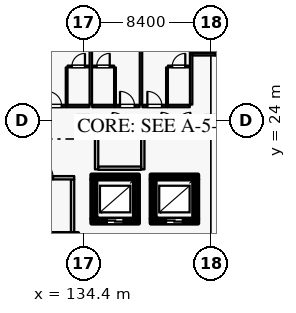
"""IFC4 building model, lengths in metres.
Left out: names, types, materials, properties, quantities, classifications, styles, units other than length and angle.
Written with IfcOpenShell. Run it as: python <this file> out.ifc"""

import sys

from ifc_helpers import new_model, si_unit, direction, frame, frame_2d, origin, origin_2d, place, context, subcontext, project, spatial, rectangle, extrude, element, fill, save


model = new_model("IFC4")
c1 = context("Model", 3, precision=1e-05, world=origin(), true_north=direction((0.0, 1.0)))
c2 = subcontext(c1, "Body", "Model", "MODEL_VIEW")
j1 = project(units=[si_unit("LENGTHUNIT", "METRE"), si_unit("PLANEANGLEUNIT", "RADIAN")], contexts=[c1])
p1 = place(None, origin())
s1 = spatial("IfcSite", under=j1, at=p1, CompositionType="ELEMENT")
p2 = place(p1, origin())
s2 = spatial("IfcBuilding", under=s1, at=p2, CompositionType="ELEMENT")
p3 = place(p2, frame((0.0, 0.0, 32.4)))
s3 = spatial("IfcBuildingStorey", under=s2, at=p3, CompositionType="ELEMENT", Elevation=32.4)
for number, where, z_axis, x_axis in (
    (1, (134.4, 24.0, 0.0), (0.0, 0.0, 1.0), (1.0, 0.0, 0.0)),
    (2, (142.8, 24.0, 0.0), (0.0, 0.0, 1.0), (1.0, 0.0, 0.0)),
):
    element("IfcColumn", number, at=place(p3, frame(where, z_axis=z_axis, x_axis=x_axis)), inside=s3, PredefinedType="COLUMN", context=c2, shape_type="SweptSolid", body=[
        extrude(rectangle(XDim=0.6, YDim=0.6, at=origin_2d()), origin(), (0.0, 0.0, 1.0), 3.6),
    ])
p4 = place(p3, frame((134.95, 17.4, 0.0), z_axis=(0.0, 0.0, 1.0), x_axis=(1.0, 0.0, 0.0)))
e3 = element("IfcWall", 3, at=p4, inside=s3, PredefinedType="SHEAR", context=c2, shape_type="SweptSolid", body=[
    extrude(rectangle(XDim=3.1, YDim=0.3, at=frame_2d((1.55, 0.0))), origin(), (0.0, 0.0, 1.0), 3.335),
])
p5 = place(p4, frame((1.0, 0.0, 0.0)))
e4 = element("IfcOpeningElement", 4, at=p5, cuts=e3, PredefinedType="OPENING", context=c2, shape_type="SweptSolid", body=[
    extrude(rectangle(XDim=1.1, YDim=2.2, at=frame_2d((0.55, 1.1))), frame((0.0, 0.16, 0.0), z_axis=(0.0, -1.0, 0.0), x_axis=(1.0, 0.0, 0.0)), (0.0, 0.0, 1.0), 0.32),
])
p6 = place(p3, frame((137.9, 17.555, 0.0), z_axis=(0.0, 0.0, 1.0), x_axis=(0.0, 1.0, 0.0)))
e5 = element("IfcWall", 5, at=p6, inside=s3, PredefinedType="SHEAR", context=c2, shape_type="SweptSolid", body=[
    extrude(rectangle(XDim=2.59, YDim=0.3, at=frame_2d((1.295, 0.0))), origin(), (0.0, 0.0, 1.0), 3.335),
])
p7 = place(p3, frame((138.05, 20.3, 0.0), z_axis=(0.0, 0.0, 1.0), x_axis=(-1.0, 0.0, 0.0)))
e6 = element("IfcWall", 6, at=p7, inside=s3, PredefinedType="SHEAR", context=c2, shape_type="SweptSolid", body=[
    extrude(rectangle(XDim=3.1, YDim=0.3, at=frame_2d((1.55, 0.0))), origin(), (0.0, 0.0, 1.0), 3.335),
])
p8 = place(p3, frame((135.1, 20.145, 0.0), z_axis=(0.0, 0.0, 1.0), x_axis=(0.0, -1.0, 0.0)))
e7 = element("IfcWall", 7, at=p8, inside=s3, PredefinedType="SHEAR", context=c2, shape_type="SweptSolid", body=[
    extrude(rectangle(XDim=2.59, YDim=0.3, at=frame_2d((1.295, 0.0))), origin(), (0.0, 0.0, 1.0), 3.335),
])
p9 = place(p3, frame((138.85, 17.4, 0.0), z_axis=(0.0, 0.0, 1.0), x_axis=(1.0, 0.0, 0.0)))
e8 = element("IfcWall", 8, at=p9, inside=s3, PredefinedType="SHEAR", context=c2, shape_type="SweptSolid", body=[
    extrude(rectangle(XDim=3.1, YDim=0.3, at=frame_2d((1.55, 0.0))), origin(), (0.0, 0.0, 1.0), 3.335),
])
p10 = place(p9, frame((1.0, 0.0, 0.0)))
e9 = element("IfcOpeningElement", 9, at=p10, cuts=e8, PredefinedType="OPENING", context=c2, shape_type="SweptSolid", body=[
    extrude(rectangle(XDim=1.1, YDim=2.2, at=frame_2d((0.55, 1.1))), frame((0.0, 0.16, 0.0), z_axis=(0.0, -1.0, 0.0), x_axis=(1.0, 0.0, 0.0)), (0.0, 0.0, 1.0), 0.32),
])
p11 = place(p3, frame((141.8, 17.555, 0.0), z_axis=(0.0, 0.0, 1.0), x_axis=(0.0, 1.0, 0.0)))
e10 = element("IfcWall", 10, at=p11, inside=s3, PredefinedType="SHEAR", context=c2, shape_type="SweptSolid", body=[
    extrude(rectangle(XDim=2.59, YDim=0.3, at=frame_2d((1.295, 0.0))), origin(), (0.0, 0.0, 1.0), 3.335),
])
p12 = place(p3, frame((141.95, 20.3, 0.0), z_axis=(0.0, 0.0, 1.0), x_axis=(-1.0, 0.0, 0.0)))
e11 = element("IfcWall", 11, at=p12, inside=s3, PredefinedType="SHEAR", context=c2, shape_type="SweptSolid", body=[
    extrude(rectangle(XDim=3.1, YDim=0.3, at=frame_2d((1.55, 0.0))), origin(), (0.0, 0.0, 1.0), 3.335),
])
p13 = place(p3, frame((139.0, 20.145, 0.0), z_axis=(0.0, 0.0, 1.0), x_axis=(0.0, -1.0, 0.0)))
e12 = element("IfcWall", 12, at=p13, inside=s3, PredefinedType="SHEAR", context=c2, shape_type="SweptSolid", body=[
    extrude(rectangle(XDim=2.59, YDim=0.3, at=frame_2d((1.295, 0.0))), origin(), (0.0, 0.0, 1.0), 3.335),
])
p14 = place(p3, frame((134.06, 16.45, 0.0), z_axis=(0.0, 0.0, 1.0), x_axis=(-1.0, 0.0, 0.0)))
e13 = element("IfcWall", 13, at=p14, inside=s3, PredefinedType="SHEAR", context=c2, shape_type="SweptSolid", body=[
    extrude(rectangle(XDim=4.01, YDim=0.3, at=frame_2d((2.005, 0.0))), origin(), (0.0, 0.0, 1.0), 3.335),
])
p15 = place(p14, frame((1.635, 0.0, 0.0)))
e14 = element("IfcOpeningElement", 14, at=p15, cuts=e13, PredefinedType="OPENING", context=c2, shape_type="SweptSolid", body=[
    extrude(rectangle(XDim=1.25, YDim=2.25, at=frame_2d((0.625, 1.125))), frame((0.0, 0.16, 0.0), z_axis=(0.0, -1.0, 0.0), x_axis=(1.0, 0.0, 0.0)), (0.0, 0.0, 1.0), 0.32),
])
p16 = place(p3, frame((133.7, 16.605, 0.0), z_axis=(0.0, 0.0, 1.0), x_axis=(0.0, 1.0, 0.0)))
e15 = element("IfcWall", 15, at=p16, inside=s3, PredefinedType="PARTITIONING", context=c2, shape_type="SweptSolid", body=[
    extrude(rectangle(XDim=3.53, YDim=0.22, at=frame_2d((1.765, 0.0))), origin(), (0.0, 0.0, 1.0), 3.335),
])
p17 = place(p3, frame((129.79, 20.25, 0.0), z_axis=(0.0, 0.0, 1.0), x_axis=(1.0, 0.0, 0.0)))
e16 = element("IfcWall", 16, at=p17, inside=s3, PredefinedType="PARTITIONING", context=c2, shape_type="SweptSolid", body=[
    extrude(rectangle(XDim=4.02, YDim=0.22, at=frame_2d((2.01, 0.0))), origin(), (0.0, 0.0, 1.0), 3.335),
])
p18 = place(p17, frame((1.39, 0.0, 0.0)))
e17 = element("IfcOpeningElement", 17, at=p18, cuts=e16, PredefinedType="OPENING", context=c2, shape_type="SweptSolid", body=[
    extrude(rectangle(XDim=1.24, YDim=2.2, at=frame_2d((0.62, 1.1))), frame((0.0, 0.12, 0.0), z_axis=(0.0, -1.0, 0.0), x_axis=(1.0, 0.0, 0.0)), (0.0, 0.0, 1.0), 0.24),
])
p19 = place(p3, frame((131.69, 24.97, 0.0), z_axis=(0.0, 0.0, 1.0), x_axis=(1.0, 0.0, 0.0)))
e18 = element("IfcWall", 18, at=p19, inside=s3, PredefinedType="PARTITIONING", context=c2, shape_type="SweptSolid", body=[
    extrude(rectangle(XDim=1.62, YDim=0.16, at=frame_2d((0.81, 0.0))), origin(), (0.0, 0.0, 1.0), 3.335),
])
p20 = place(p19, frame((0.33, 0.0, 0.0)))
e19 = element("IfcOpeningElement", 19, at=p20, cuts=e18, PredefinedType="OPENING", context=c2, shape_type="SweptSolid", body=[
    extrude(rectangle(XDim=0.96, YDim=2.2, at=frame_2d((0.48, 1.1))), frame((0.0, 0.09, 0.0), z_axis=(0.0, -1.0, 0.0), x_axis=(1.0, 0.0, 0.0)), (0.0, 0.0, 1.0), 0.18),
])
p21 = place(p3, frame((133.32, 24.97, 0.0), z_axis=(0.0, 0.0, 1.0), x_axis=(1.0, 0.0, 0.0)))
e20 = element("IfcWall", 20, at=p21, inside=s3, PredefinedType="PARTITIONING", context=c2, shape_type="SweptSolid", body=[
    extrude(rectangle(XDim=1.49, YDim=0.16, at=frame_2d((0.745, 0.0))), origin(), (0.0, 0.0, 1.0), 3.335),
])
p22 = place(p3, frame((133.31, 25.06, 0.0), z_axis=(0.0, 0.0, 1.0), x_axis=(0.0, 1.0, 0.0)))
e21 = element("IfcWall", 21, at=p22, inside=s3, PredefinedType="PARTITIONING", context=c2, shape_type="SweptSolid", body=[
    extrude(rectangle(XDim=2.45, YDim=0.115, at=frame_2d((1.225, 0.0))), origin(), (0.0, 0.0, 1.0), 3.335),
])
p23 = place(p3, frame((133.37, 27.57, 0.0), z_axis=(0.0, 0.0, 1.0), x_axis=(1.0, 0.0, 0.0)))
e22 = element("IfcWall", 22, at=p23, inside=s3, PredefinedType="PARTITIONING", context=c2, shape_type="SweptSolid", body=[
    extrude(rectangle(XDim=1.43, YDim=0.115, at=frame_2d((0.715, 0.0))), origin(), (0.0, 0.0, 1.0), 3.335),
])
p24 = place(p23, frame((0.285, 0.0, 0.0)))
e23 = element("IfcOpeningElement", 23, at=p24, cuts=e22, PredefinedType="OPENING", context=c2, shape_type="SweptSolid", body=[
    extrude(rectangle(XDim=0.86, YDim=2.12, at=frame_2d((0.43, 1.06))), frame((0.0, 0.067, 0.0), z_axis=(0.0, -1.0, 0.0), x_axis=(1.0, 0.0, 0.0)), (0.0, 0.0, 1.0), 0.135),
])
p25 = place(p3, frame((134.99, 24.97, 0.0), z_axis=(0.0, 0.0, 1.0), x_axis=(1.0, 0.0, 0.0)))
e24 = element("IfcWall", 24, at=p25, inside=s3, PredefinedType="PARTITIONING", context=c2, shape_type="SweptSolid", body=[
    extrude(rectangle(XDim=1.49, YDim=0.16, at=frame_2d((0.745, 0.0))), origin(), (0.0, 0.0, 1.0), 3.335),
])
p26 = place(p3, frame((136.49, 24.97, 0.0), z_axis=(0.0, 0.0, 1.0), x_axis=(1.0, 0.0, 0.0)))
e25 = element("IfcWall", 25, at=p26, inside=s3, PredefinedType="PARTITIONING", context=c2, shape_type="SweptSolid", body=[
    extrude(rectangle(XDim=1.62, YDim=0.16, at=frame_2d((0.81, 0.0))), origin(), (0.0, 0.0, 1.0), 3.335),
])
p27 = place(p26, frame((0.33, 0.0, 0.0)))
e26 = element("IfcOpeningElement", 26, at=p27, cuts=e25, PredefinedType="OPENING", context=c2, shape_type="SweptSolid", body=[
    extrude(rectangle(XDim=0.96, YDim=2.2, at=frame_2d((0.48, 1.1))), frame((0.0, 0.09, 0.0), z_axis=(0.0, -1.0, 0.0), x_axis=(1.0, 0.0, 0.0)), (0.0, 0.0, 1.0), 0.18),
])
p28 = place(p3, frame((136.49, 25.06, 0.0), z_axis=(0.0, 0.0, 1.0), x_axis=(0.0, 1.0, 0.0)))
e27 = element("IfcWall", 27, at=p28, inside=s3, PredefinedType="PARTITIONING", context=c2, shape_type="SweptSolid", body=[
    extrude(rectangle(XDim=2.45, YDim=0.115, at=frame_2d((1.225, 0.0))), origin(), (0.0, 0.0, 1.0), 3.335),
])
p29 = place(p3, frame((135.0, 27.57, 0.0), z_axis=(0.0, 0.0, 1.0), x_axis=(1.0, 0.0, 0.0)))
e28 = element("IfcWall", 28, at=p29, inside=s3, PredefinedType="PARTITIONING", context=c2, shape_type="SweptSolid", body=[
    extrude(rectangle(XDim=1.43, YDim=0.115, at=frame_2d((0.715, 0.0))), origin(), (0.0, 0.0, 1.0), 3.335),
])
p30 = place(p29, frame((0.285, 0.0, 0.0)))
e29 = element("IfcOpeningElement", 29, at=p30, cuts=e28, PredefinedType="OPENING", context=c2, shape_type="SweptSolid", body=[
    extrude(rectangle(XDim=0.86, YDim=2.12, at=frame_2d((0.43, 1.06))), frame((0.0, 0.067, 0.0), z_axis=(0.0, -1.0, 0.0), x_axis=(1.0, 0.0, 0.0)), (0.0, 0.0, 1.0), 0.135),
])
p31 = place(p3, frame((134.9, 25.06, 0.0), z_axis=(0.0, 0.0, 1.0), x_axis=(0.0, 1.0, 0.0)))
e30 = element("IfcWall", 30, at=p31, inside=s3, PredefinedType="PARTITIONING", context=c2, shape_type="SweptSolid", body=[
    extrude(rectangle(XDim=6.6, YDim=0.16, at=frame_2d((3.3, 0.0))), origin(), (0.0, 0.0, 1.0), 3.335),
])
p32 = place(p3, frame((138.29, 24.97, 0.0), z_axis=(0.0, 0.0, 1.0), x_axis=(1.0, 0.0, 0.0)))
e31 = element("IfcWall", 31, at=p32, inside=s3, PredefinedType="PARTITIONING", context=c2, shape_type="SweptSolid", body=[
    extrude(rectangle(XDim=1.62, YDim=0.16, at=frame_2d((0.81, 0.0))), origin(), (0.0, 0.0, 1.0), 3.335),
])
p33 = place(p32, frame((0.33, 0.0, 0.0)))
e32 = element("IfcOpeningElement", 32, at=p33, cuts=e31, PredefinedType="OPENING", context=c2, shape_type="SweptSolid", body=[
    extrude(rectangle(XDim=0.96, YDim=2.2, at=frame_2d((0.48, 1.1))), frame((0.0, 0.09, 0.0), z_axis=(0.0, -1.0, 0.0), x_axis=(1.0, 0.0, 0.0)), (0.0, 0.0, 1.0), 0.18),
])
p34 = place(p3, frame((139.92, 24.97, 0.0), z_axis=(0.0, 0.0, 1.0), x_axis=(1.0, 0.0, 0.0)))
e33 = element("IfcWall", 33, at=p34, inside=s3, PredefinedType="PARTITIONING", context=c2, shape_type="SweptSolid", body=[
    extrude(rectangle(XDim=1.49, YDim=0.16, at=frame_2d((0.745, 0.0))), origin(), (0.0, 0.0, 1.0), 3.335),
])
p35 = place(p3, frame((139.91, 25.06, 0.0), z_axis=(0.0, 0.0, 1.0), x_axis=(0.0, 1.0, 0.0)))
e34 = element("IfcWall", 34, at=p35, inside=s3, PredefinedType="PARTITIONING", context=c2, shape_type="SweptSolid", body=[
    extrude(rectangle(XDim=2.45, YDim=0.115, at=frame_2d((1.225, 0.0))), origin(), (0.0, 0.0, 1.0), 3.335),
])
p36 = place(p3, frame((139.97, 27.57, 0.0), z_axis=(0.0, 0.0, 1.0), x_axis=(1.0, 0.0, 0.0)))
e35 = element("IfcWall", 35, at=p36, inside=s3, PredefinedType="PARTITIONING", context=c2, shape_type="SweptSolid", body=[
    extrude(rectangle(XDim=1.43, YDim=0.115, at=frame_2d((0.715, 0.0))), origin(), (0.0, 0.0, 1.0), 3.335),
])
p37 = place(p36, frame((0.285, 0.0, 0.0)))
e36 = element("IfcOpeningElement", 36, at=p37, cuts=e35, PredefinedType="OPENING", context=c2, shape_type="SweptSolid", body=[
    extrude(rectangle(XDim=0.86, YDim=2.12, at=frame_2d((0.43, 1.06))), frame((0.0, 0.067, 0.0), z_axis=(0.0, -1.0, 0.0), x_axis=(1.0, 0.0, 0.0)), (0.0, 0.0, 1.0), 0.135),
])
p38 = place(p3, frame((138.2, 25.06, 0.0), z_axis=(0.0, 0.0, 1.0), x_axis=(0.0, 1.0, 0.0)))
e37 = element("IfcWall", 37, at=p38, inside=s3, PredefinedType="PARTITIONING", context=c2, shape_type="SweptSolid", body=[
    extrude(rectangle(XDim=6.6, YDim=0.16, at=frame_2d((3.3, 0.0))), origin(), (0.0, 0.0, 1.0), 3.335),
])
p39 = place(p3, frame((141.5, 25.06, 0.0), z_axis=(0.0, 0.0, 1.0), x_axis=(0.0, 1.0, 0.0)))
e38 = element("IfcWall", 38, at=p39, inside=s3, PredefinedType="PARTITIONING", context=c2, shape_type="SweptSolid", body=[
    extrude(rectangle(XDim=3.39, YDim=0.16, at=frame_2d((1.695, 0.0))), origin(), (0.0, 0.0, 1.0), 3.335),
])
p40 = place(p3, frame((141.59, 28.37, 0.0), z_axis=(0.0, 0.0, 1.0), x_axis=(1.0, 0.0, 0.0)))
e39 = element("IfcWall", 39, at=p40, inside=s3, PredefinedType="PARTITIONING", context=c2, shape_type="SweptSolid", body=[
    extrude(rectangle(XDim=1.49, YDim=0.16, at=frame_2d((0.745, 0.0))), origin(), (0.0, 0.0, 1.0), 3.335),
])
p41 = place(p3, frame((143.09, 28.37, 0.0), z_axis=(0.0, 0.0, 1.0), x_axis=(1.0, 0.0, 0.0)))
e40 = element("IfcWall", 40, at=p41, inside=s3, PredefinedType="PARTITIONING", context=c2, shape_type="SweptSolid", body=[
    extrude(rectangle(XDim=1.62, YDim=0.16, at=frame_2d((0.81, 0.0))), origin(), (0.0, 0.0, 1.0), 3.335),
])
p42 = place(p41, frame((0.33, 0.0, 0.0)))
e41 = element("IfcOpeningElement", 41, at=p42, cuts=e40, PredefinedType="OPENING", context=c2, shape_type="SweptSolid", body=[
    extrude(rectangle(XDim=0.96, YDim=2.2, at=frame_2d((0.48, 1.1))), frame((0.0, 0.09, 0.0), z_axis=(0.0, -1.0, 0.0), x_axis=(1.0, 0.0, 0.0)), (0.0, 0.0, 1.0), 0.18),
])
p43 = place(p3, frame((143.09, 28.46, 0.0), z_axis=(0.0, 0.0, 1.0), x_axis=(0.0, 1.0, 0.0)))
e42 = element("IfcWall", 42, at=p43, inside=s3, PredefinedType="PARTITIONING", context=c2, shape_type="SweptSolid", body=[
    extrude(rectangle(XDim=1.74, YDim=0.115, at=frame_2d((0.87, 0.0))), origin(), (0.0, 0.0, 1.0), 3.335),
])
p44 = place(p3, frame((141.5, 28.46, 0.0), z_axis=(0.0, 0.0, 1.0), x_axis=(0.0, 1.0, 0.0)))
e43 = element("IfcWall", 43, at=p44, inside=s3, PredefinedType="PARTITIONING", context=c2, shape_type="SweptSolid", body=[
    extrude(rectangle(XDim=3.2, YDim=0.16, at=frame_2d((1.6, 0.0))), origin(), (0.0, 0.0, 1.0), 3.335),
])
p45 = place(p3, frame((138.96, 23.6, 0.0), z_axis=(0.0, 0.0, 1.0), x_axis=(1.0, 0.0, 0.0)))
e44 = element("IfcWall", 44, at=p45, inside=s3, PredefinedType="PARTITIONING", context=c2, shape_type="SweptSolid", body=[
    extrude(rectangle(XDim=3.08, YDim=0.14, at=frame_2d((1.54, 0.0))), origin(), (0.0, 0.0, 1.0), 3.335),
])
p46 = place(p45, frame((0.59, 0.0, 0.0)))
e45 = element("IfcOpeningElement", 45, at=p46, cuts=e44, PredefinedType="OPENING", context=c2, shape_type="SweptSolid", body=[
    extrude(rectangle(XDim=1.9, YDim=2.4, at=frame_2d((0.95, 1.2))), frame((0.0, 0.08, 0.0), z_axis=(0.0, -1.0, 0.0), x_axis=(1.0, 0.0, 0.0)), (0.0, 0.0, 1.0), 0.16),
])
p47 = place(p3, frame((135.36, 23.6, 0.0), z_axis=(0.0, 0.0, 1.0), x_axis=(1.0, 0.0, 0.0)))
e46 = element("IfcWall", 46, at=p47, inside=s3, PredefinedType="PARTITIONING", context=c2, shape_type="SweptSolid", body=[
    extrude(rectangle(XDim=2.88, YDim=0.22, at=frame_2d((1.44, 0.0))), origin(), (0.0, 0.0, 1.0), 3.335),
])
p48 = place(p47, frame((0.97, 0.0, 0.0)))
e47 = element("IfcOpeningElement", 47, at=p48, cuts=e46, PredefinedType="OPENING", context=c2, shape_type="SweptSolid", body=[
    extrude(rectangle(XDim=0.94, YDim=2.15, at=frame_2d((0.47, 1.075))), frame((0.0, 0.12, 0.0), z_axis=(0.0, -1.0, 0.0), x_axis=(1.0, 0.0, 0.0)), (0.0, 0.0, 1.0), 0.24),
])
for number, where, z_axis, x_axis in (
    (48, (135.28, 20.8, 0.0), (0.0, 0.0, 1.0), (0.0, 1.0, 0.0)),
    (49, (138.32, 20.8, 0.0), (0.0, 0.0, 1.0), (0.0, 1.0, 0.0)),
):
    element("IfcWall", number, at=place(p3, frame(where, z_axis=z_axis, x_axis=x_axis)), inside=s3, PredefinedType="PARTITIONING", context=c2, shape_type="SweptSolid", body=[
        extrude(rectangle(XDim=2.748, YDim=0.22, at=frame_2d((1.374, 0.0))), origin(), (0.0, 0.0, 1.0), 3.335),
    ])
p49 = place(p3, frame((135.39, 20.88, 0.0), z_axis=(0.0, 0.0, 1.0), x_axis=(1.0, 0.0, 0.0)))
e50 = element("IfcWall", 50, at=p49, inside=s3, PredefinedType="PARTITIONING", context=c2, shape_type="SweptSolid", body=[
    extrude(rectangle(XDim=2.82, YDim=0.22, at=frame_2d((1.41, 0.0))), origin(), (0.0, 0.0, 1.0), 3.335),
])
p50 = place(p5, origin())
e51 = element("IfcDoor", 51, at=p50, inside=s3, OperationType="DOUBLE_DOOR_SLIDING", PredefinedType="DOOR", context=c2, shape_type="SweptSolid", body=[
    extrude(rectangle(XDim=1.1, YDim=2.2, at=frame_2d((0.55, 1.1))), frame((0.0, 0.025, 0.0), z_axis=(0.0, -1.0, 0.0), x_axis=(1.0, 0.0, 0.0)), (0.0, 0.0, 1.0), 0.05),
])
fill(e4, e51)
p51 = place(p10, origin())
e52 = element("IfcDoor", 52, at=p51, inside=s3, OperationType="DOUBLE_DOOR_SLIDING", PredefinedType="DOOR", context=c2, shape_type="SweptSolid", body=[
    extrude(rectangle(XDim=1.1, YDim=2.2, at=frame_2d((0.55, 1.1))), frame((0.0, 0.025, 0.0), z_axis=(0.0, -1.0, 0.0), x_axis=(1.0, 0.0, 0.0)), (0.0, 0.0, 1.0), 0.05),
])
fill(e9, e52)
p52 = place(p18, origin())
e53 = element("IfcDoor", 53, at=p52, inside=s3, OperationType="SINGLE_SWING_LEFT", PredefinedType="DOOR", context=c2, shape_type="SweptSolid", body=[
    extrude(rectangle(XDim=1.24, YDim=2.2, at=frame_2d((0.62, 1.1))), frame((0.0, 0.025, 0.0), z_axis=(0.0, -1.0, 0.0), x_axis=(1.0, 0.0, 0.0)), (0.0, 0.0, 1.0), 0.05),
])
fill(e17, e53)
p53 = place(p20, origin())
e54 = element("IfcDoor", 54, at=p53, inside=s3, OperationType="SINGLE_SWING_LEFT", PredefinedType="DOOR", context=c2, shape_type="SweptSolid", body=[
    extrude(rectangle(XDim=0.96, YDim=2.2, at=frame_2d((0.48, 1.1))), frame((0.0, 0.025, 0.0), z_axis=(0.0, -1.0, 0.0), x_axis=(1.0, 0.0, 0.0)), (0.0, 0.0, 1.0), 0.05),
])
fill(e19, e54)
p54 = place(p24, origin())
e55 = element("IfcDoor", 55, at=p54, inside=s3, OperationType="SINGLE_SWING_RIGHT", PredefinedType="DOOR", context=c2, shape_type="SweptSolid", body=[
    extrude(rectangle(XDim=0.86, YDim=2.12, at=frame_2d((0.43, 1.06))), frame((0.0, 0.025, 0.0), z_axis=(0.0, -1.0, 0.0), x_axis=(1.0, 0.0, 0.0)), (0.0, 0.0, 1.0), 0.05),
])
fill(e23, e55)
p55 = place(p27, origin())
e56 = element("IfcDoor", 56, at=p55, inside=s3, OperationType="SINGLE_SWING_LEFT", PredefinedType="DOOR", context=c2, shape_type="SweptSolid", body=[
    extrude(rectangle(XDim=0.96, YDim=2.2, at=frame_2d((0.48, 1.1))), frame((0.0, 0.025, 0.0), z_axis=(0.0, -1.0, 0.0), x_axis=(1.0, 0.0, 0.0)), (0.0, 0.0, 1.0), 0.05),
])
fill(e26, e56)
p56 = place(p30, origin())
e57 = element("IfcDoor", 57, at=p56, inside=s3, OperationType="SINGLE_SWING_RIGHT", PredefinedType="DOOR", context=c2, shape_type="SweptSolid", body=[
    extrude(rectangle(XDim=0.86, YDim=2.12, at=frame_2d((0.43, 1.06))), frame((0.0, 0.025, 0.0), z_axis=(0.0, -1.0, 0.0), x_axis=(1.0, 0.0, 0.0)), (0.0, 0.0, 1.0), 0.05),
])
fill(e29, e57)
p57 = place(p33, origin())
e58 = element("IfcDoor", 58, at=p57, inside=s3, OperationType="SINGLE_SWING_LEFT", PredefinedType="DOOR", context=c2, shape_type="SweptSolid", body=[
    extrude(rectangle(XDim=0.96, YDim=2.2, at=frame_2d((0.48, 1.1))), frame((0.0, 0.025, 0.0), z_axis=(0.0, -1.0, 0.0), x_axis=(1.0, 0.0, 0.0)), (0.0, 0.0, 1.0), 0.05),
])
fill(e32, e58)
p58 = place(p37, origin())
e59 = element("IfcDoor", 59, at=p58, inside=s3, OperationType="SINGLE_SWING_RIGHT", PredefinedType="DOOR", context=c2, shape_type="SweptSolid", body=[
    extrude(rectangle(XDim=0.86, YDim=2.12, at=frame_2d((0.43, 1.06))), frame((0.0, 0.025, 0.0), z_axis=(0.0, -1.0, 0.0), x_axis=(1.0, 0.0, 0.0)), (0.0, 0.0, 1.0), 0.05),
])
fill(e36, e59)
p59 = place(p46, origin())
e60 = element("IfcDoor", 60, at=p59, inside=s3, OperationType="DOUBLE_DOOR_SINGLE_SWING", PredefinedType="DOOR", context=c2, shape_type="SweptSolid", body=[
    extrude(rectangle(XDim=1.9, YDim=2.4, at=frame_2d((0.95, 1.2))), frame((0.0, 0.025, 0.0), z_axis=(0.0, -1.0, 0.0), x_axis=(1.0, 0.0, 0.0)), (0.0, 0.0, 1.0), 0.05),
])
fill(e45, e60)
p60 = place(p48, origin())
e61 = element("IfcDoor", 61, at=p60, inside=s3, OperationType="SINGLE_SWING_LEFT", PredefinedType="DOOR", context=c2, shape_type="SweptSolid", body=[
    extrude(rectangle(XDim=0.94, YDim=2.15, at=frame_2d((0.47, 1.075))), frame((0.0, 0.025, 0.0), z_axis=(0.0, -1.0, 0.0), x_axis=(1.0, 0.0, 0.0)), (0.0, 0.0, 1.0), 0.05),
])
fill(e47, e61)
save(model, sys.argv[1])
